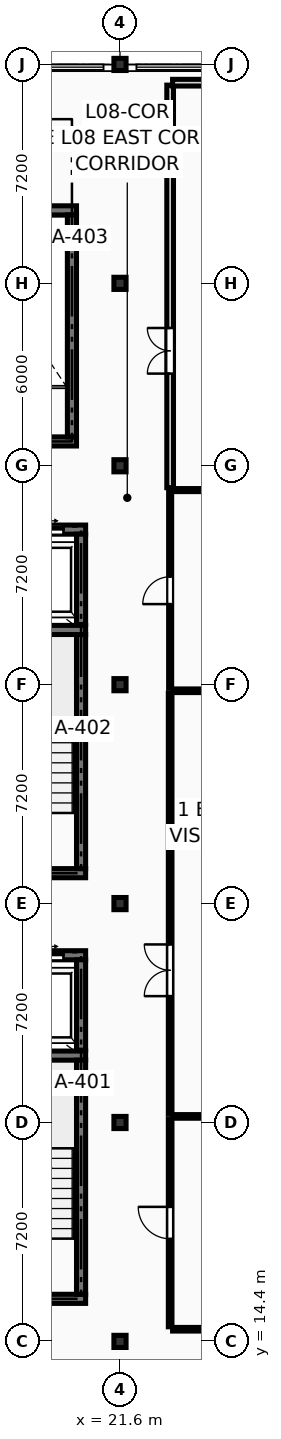
"""IFC4 building model, lengths in metres.
Left out: names, types, materials, properties, quantities, classifications, styles, units other than length and angle.
Written with IfcOpenShell. Run it as: python <this file> out.ifc"""

import sys

from ifc_helpers import new_model, si_unit, direction, frame, frame_2d, origin, origin_2d, place, context, subcontext, project, spatial, rectangle, extrude, element, fill, save


model = new_model("IFC4")
c1 = context("Model", 3, precision=1e-05, world=origin(), true_north=direction((0.0, 1.0)))
c2 = subcontext(c1, "Body", "Model", "MODEL_VIEW")
j1 = project(units=[si_unit("LENGTHUNIT", "METRE"), si_unit("PLANEANGLEUNIT", "RADIAN")], contexts=[c1])
p1 = place(None, origin())
s1 = spatial("IfcSite", under=j1, at=p1, CompositionType="ELEMENT")
p2 = place(p1, origin())
s2 = spatial("IfcBuilding", under=s1, at=p2, CompositionType="ELEMENT")
p3 = place(p2, frame((0.0, 0.0, 29.7)))
s3 = spatial("IfcBuildingStorey", under=s2, at=p3, CompositionType="ELEMENT", Elevation=29.7)
for number, where, z_axis, x_axis in (
    (1, (21.6, 14.4, 0.0), (0.0, 0.0, 1.0), (1.0, 0.0, 0.0)),
    (2, (21.6, 21.6, 0.0), (0.0, 0.0, 1.0), (1.0, 0.0, 0.0)),
    (3, (21.6, 28.8, 0.0), (0.0, 0.0, 1.0), (1.0, 0.0, 0.0)),
    (4, (21.6, 36.0, 0.0), (0.0, 0.0, 1.0), (1.0, 0.0, 0.0)),
    (5, (21.6, 43.2, 0.0), (0.0, 0.0, 1.0), (1.0, 0.0, 0.0)),
    (6, (21.6, 49.2, 0.0), (0.0, 0.0, 1.0), (1.0, 0.0, 0.0)),
    (7, (21.6, 56.4, 0.0), (0.0, 0.0, 1.0), (1.0, 0.0, 0.0)),
):
    element("IfcColumn", number, at=place(p3, frame(where, z_axis=z_axis, x_axis=x_axis)), inside=s3, PredefinedType="COLUMN", context=c2, shape_type="SweptSolid", body=[
        extrude(rectangle(XDim=0.4, YDim=0.4, at=origin_2d()), origin(), (0.0, 0.0, 1.0), 3.6),
    ])
for number, where, z_axis, x_axis in (
    (8, (15.65, 15.8, 0.0), (0.0, 0.0, 1.0), (1.0, 0.0, 0.0)),
    (9, (15.65, 23.8, 0.0), (0.0, 0.0, 1.0), (1.0, 0.0, 0.0)),
):
    element("IfcWall", number, at=place(p3, frame(where, z_axis=z_axis, x_axis=x_axis)), inside=s3, PredefinedType="SHEAR", context=c2, shape_type="SweptSolid", body=[
        extrude(rectangle(XDim=4.82, YDim=0.3, at=frame_2d((2.41, 0.0))), origin(), (0.0, 0.0, 1.0), 3.4),
    ])
p4 = place(p3, frame((20.32, 15.95, 0.0), z_axis=(0.0, 0.0, 1.0), x_axis=(0.0, 1.0, 0.0)))
e10 = element("IfcWall", 10, at=p4, inside=s3, PredefinedType="SHEAR", context=c2, shape_type="SweptSolid", body=[
    extrude(rectangle(XDim=7.7, YDim=0.3, at=frame_2d((3.85, 0.0))), origin(), (0.0, 0.0, 1.0), 3.4),
])
for number, where, z_axis, x_axis in (
    (11, (15.65, 29.8, 0.0), (0.0, 0.0, 1.0), (1.0, 0.0, 0.0)),
    (12, (15.65, 37.8, 0.0), (0.0, 0.0, 1.0), (1.0, 0.0, 0.0)),
):
    element("IfcWall", number, at=place(p3, frame(where, z_axis=z_axis, x_axis=x_axis)), inside=s3, PredefinedType="SHEAR", context=c2, shape_type="SweptSolid", body=[
        extrude(rectangle(XDim=4.82, YDim=0.3, at=frame_2d((2.41, 0.0))), origin(), (0.0, 0.0, 1.0), 3.4),
    ])
p5 = place(p3, frame((20.32, 29.95, 0.0), z_axis=(0.0, 0.0, 1.0), x_axis=(0.0, 1.0, 0.0)))
e13 = element("IfcWall", 13, at=p5, inside=s3, PredefinedType="SHEAR", context=c2, shape_type="SweptSolid", body=[
    extrude(rectangle(XDim=7.7, YDim=0.3, at=frame_2d((3.85, 0.0))), origin(), (0.0, 0.0, 1.0), 3.4),
])
for number, where, z_axis, x_axis in (
    (14, (15.75, 44.0, 0.0), (0.0, 0.0, 1.0), (1.0, 0.0, 0.0)),
    (15, (15.75, 51.6, 0.0), (0.0, 0.0, 1.0), (1.0, 0.0, 0.0)),
):
    element("IfcWall", number, at=place(p3, frame(where, z_axis=z_axis, x_axis=x_axis)), inside=s3, PredefinedType="SHEAR", context=c2, shape_type="SweptSolid", body=[
        extrude(rectangle(XDim=4.42, YDim=0.3, at=frame_2d((2.21, 0.0))), origin(), (0.0, 0.0, 1.0), 3.4),
    ])
p6 = place(p3, frame((20.02, 44.15, 0.0), z_axis=(0.0, 0.0, 1.0), x_axis=(0.0, 1.0, 0.0)))
e16 = element("IfcWall", 16, at=p6, inside=s3, PredefinedType="SHEAR", context=c2, shape_type="SweptSolid", body=[
    extrude(rectangle(XDim=7.3, YDim=0.3, at=frame_2d((3.65, 0.0))), origin(), (0.0, 0.0, 1.0), 3.4),
])
p7 = place(p3, frame((17.91, 27.1, 0.0), z_axis=(0.0, 0.0, 1.0), x_axis=(1.0, 0.0, 0.0)))
e17 = element("IfcWall", 17, at=p7, inside=s3, PredefinedType="SHEAR", context=c2, shape_type="SweptSolid", body=[
    extrude(rectangle(XDim=2.56, YDim=0.3, at=frame_2d((1.28, 0.0))), origin(), (0.0, 0.0, 1.0), 3.4),
])
p8 = place(p7, frame((0.73, 0.0, 0.0)))
e18 = element("IfcOpeningElement", 18, at=p8, cuts=e17, PredefinedType="OPENING", context=c2, shape_type="SweptSolid", body=[
    extrude(rectangle(XDim=1.1, YDim=2.2, at=frame_2d((0.55, 1.1))), frame((0.0, 0.162, 0.0), z_axis=(0.0, -1.0, 0.0), x_axis=(1.0, 0.0, 0.0)), (0.0, 0.0, 1.0), 0.324),
])
p9 = place(p3, frame((20.32, 23.98, 0.0), z_axis=(0.0, 0.0, 1.0), x_axis=(0.0, 1.0, 0.0)))
e19 = element("IfcWall", 19, at=p9, inside=s3, PredefinedType="SHEAR", context=c2, shape_type="SweptSolid", body=[
    extrude(rectangle(XDim=2.97, YDim=0.3, at=frame_2d((1.485, 0.0))), origin(), (0.0, 0.0, 1.0), 3.4),
])
p10 = place(p3, frame((17.91, 41.1, 0.0), z_axis=(0.0, 0.0, 1.0), x_axis=(1.0, 0.0, 0.0)))
e20 = element("IfcWall", 20, at=p10, inside=s3, PredefinedType="SHEAR", context=c2, shape_type="SweptSolid", body=[
    extrude(rectangle(XDim=2.56, YDim=0.3, at=frame_2d((1.28, 0.0))), origin(), (0.0, 0.0, 1.0), 3.4),
])
p11 = place(p10, frame((0.73, 0.0, 0.0)))
e21 = element("IfcOpeningElement", 21, at=p11, cuts=e20, PredefinedType="OPENING", context=c2, shape_type="SweptSolid", body=[
    extrude(rectangle(XDim=1.1, YDim=2.2, at=frame_2d((0.55, 1.1))), frame((0.0, 0.162, 0.0), z_axis=(0.0, -1.0, 0.0), x_axis=(1.0, 0.0, 0.0)), (0.0, 0.0, 1.0), 0.324),
])
p12 = place(p3, frame((20.32, 37.98, 0.0), z_axis=(0.0, 0.0, 1.0), x_axis=(0.0, 1.0, 0.0)))
e22 = element("IfcWall", 22, at=p12, inside=s3, PredefinedType="SHEAR", context=c2, shape_type="SweptSolid", body=[
    extrude(rectangle(XDim=2.97, YDim=0.3, at=frame_2d((1.485, 0.0))), origin(), (0.0, 0.0, 1.0), 3.4),
])
p13 = place(p3, frame((23.25, 14.88, 0.0), z_axis=(0.0, 0.0, 1.0), x_axis=(0.0, 1.0, 0.0)))
e23 = element("IfcWall", 23, at=p13, inside=s3, PredefinedType="PARTITIONING", context=c2, shape_type="SweptSolid", body=[
    extrude(rectangle(XDim=6.84, YDim=0.12, at=frame_2d((3.42, 0.0))), origin(), (0.0, 0.0, 1.0), 3.385),
])
p14 = place(p13, frame((2.895, 0.0, 0.0)))
e24 = element("IfcOpeningElement", 24, at=p14, cuts=e23, PredefinedType="OPENING", context=c2, shape_type="SweptSolid", body=[
    extrude(rectangle(XDim=1.05, YDim=2.18, at=frame_2d((0.525, 1.09))), frame((0.0, 0.072, 0.0), z_axis=(0.0, -1.0, 0.0), x_axis=(1.0, 0.0, 0.0)), (0.0, 0.0, 1.0), 0.144),
])
p15 = place(p3, frame((23.33, 14.8, 0.0), z_axis=(0.0, 0.0, 1.0), x_axis=(1.0, 0.0, 0.0)))
e25 = element("IfcWall", 25, at=p15, inside=s3, PredefinedType="PARTITIONING", context=c2, shape_type="SweptSolid", body=[
    extrude(rectangle(XDim=4.99, YDim=0.12, at=frame_2d((2.495, 0.0))), origin(), (0.0, 0.0, 1.0), 3.385),
])
p16 = place(p3, frame((23.33, 21.8, 0.0), z_axis=(0.0, 0.0, 1.0), x_axis=(1.0, 0.0, 0.0)))
e26 = element("IfcWall", 26, at=p16, inside=s3, PredefinedType="PARTITIONING", context=c2, shape_type="SweptSolid", body=[
    extrude(rectangle(XDim=4.99, YDim=0.12, at=frame_2d((2.495, 0.0))), origin(), (0.0, 0.0, 1.0), 2.701),
])
p17 = place(p3, frame((23.25, 21.88, 0.0), z_axis=(0.0, 0.0, 1.0), x_axis=(0.0, 1.0, 0.0)))
e27 = element("IfcWall", 27, at=p17, inside=s3, PredefinedType="PARTITIONING", context=c2, shape_type="SweptSolid", body=[
    extrude(rectangle(XDim=13.84, YDim=0.12, at=frame_2d((6.92, 0.0))), origin(), (0.0, 0.0, 1.0), 3.385),
])
p18 = place(p17, frame((3.876, 0.0, 0.0)))
e28 = element("IfcOpeningElement", 28, at=p18, cuts=e27, PredefinedType="OPENING", context=c2, shape_type="SweptSolid", body=[
    extrude(rectangle(XDim=1.7, YDim=2.28, at=frame_2d((0.85, 1.14))), frame((0.0, 0.072, 0.0), z_axis=(0.0, -1.0, 0.0), x_axis=(1.0, 0.0, 0.0)), (0.0, 0.0, 1.0), 0.144),
])
p19 = place(p3, frame((23.33, 35.8, 0.0), z_axis=(0.0, 0.0, 1.0), x_axis=(1.0, 0.0, 0.0)))
e29 = element("IfcWall", 29, at=p19, inside=s3, PredefinedType="PARTITIONING", context=c2, shape_type="SweptSolid", body=[
    extrude(rectangle(XDim=9.69, YDim=0.12, at=frame_2d((4.845, 0.0))), origin(), (0.0, 0.0, 1.0), 2.701),
])
p20 = place(p3, frame((23.25, 35.88, 0.0), z_axis=(0.0, 0.0, 1.0), x_axis=(0.0, 1.0, 0.0)))
e30 = element("IfcWall", 30, at=p20, inside=s3, PredefinedType="PARTITIONING", context=c2, shape_type="SweptSolid", body=[
    extrude(rectangle(XDim=6.44, YDim=0.1, at=frame_2d((3.22, 0.0))), origin(), (0.0, 0.0, 1.0), 3.385),
])
p21 = place(p20, frame((2.77, 0.0, 0.0)))
e31 = element("IfcOpeningElement", 31, at=p21, cuts=e30, PredefinedType="OPENING", context=c2, shape_type="SweptSolid", body=[
    extrude(rectangle(XDim=0.9, YDim=2.1, at=frame_2d((0.45, 1.05))), frame((0.0, 0.062, 0.0), z_axis=(0.0, -1.0, 0.0), x_axis=(1.0, 0.0, 0.0)), (0.0, 0.0, 1.0), 0.124),
])
p22 = place(p3, frame((23.33, 42.4, 0.0), z_axis=(0.0, 0.0, 1.0), x_axis=(1.0, 0.0, 0.0)))
e32 = element("IfcWall", 32, at=p22, inside=s3, PredefinedType="PARTITIONING", context=c2, shape_type="SweptSolid", body=[
    extrude(rectangle(XDim=4.99, YDim=0.1, at=frame_2d((2.495, 0.0))), origin(), (0.0, 0.0, 1.0), 3.385),
])
p23 = place(p3, frame((23.25, 42.48, 0.0), z_axis=(0.0, 0.0, 1.0), x_axis=(0.0, 1.0, 0.0)))
e33 = element("IfcWall", 33, at=p23, inside=s3, PredefinedType="PARTITIONING", context=c2, shape_type="SweptSolid", body=[
    extrude(rectangle(XDim=13.24, YDim=0.22, at=frame_2d((6.62, 0.0))), origin(), (0.0, 0.0, 1.0), 3.385),
])
p24 = place(p23, frame((3.751, 0.0, 0.0)))
e34 = element("IfcOpeningElement", 34, at=p24, cuts=e33, PredefinedType="OPENING", context=c2, shape_type="SweptSolid", body=[
    extrude(rectangle(XDim=1.5, YDim=2.25, at=frame_2d((0.75, 1.125))), frame((0.0, 0.122, 0.0), z_axis=(0.0, -1.0, 0.0), x_axis=(1.0, 0.0, 0.0)), (0.0, 0.0, 1.0), 0.244),
])
p25 = place(p3, frame((23.33, 55.8, 0.0), z_axis=(0.0, 0.0, 1.0), x_axis=(1.0, 0.0, 0.0)))
e35 = element("IfcWall", 35, at=p25, inside=s3, PredefinedType="PARTITIONING", context=c2, shape_type="SweptSolid", body=[
    extrude(rectangle(XDim=4.99, YDim=0.22, at=frame_2d((2.495, 0.0))), origin(), (0.0, 0.0, 1.0), 3.385),
])
p26 = place(p8, origin())
e36 = element("IfcDoor", 36, at=p26, inside=s3, OperationType="DOUBLE_DOOR_SLIDING", PredefinedType="DOOR", context=c2, shape_type="SweptSolid", body=[
    extrude(rectangle(XDim=1.1, YDim=2.2, at=frame_2d((0.55, 1.1))), frame((0.0, 0.025, 0.0), z_axis=(0.0, -1.0, 0.0), x_axis=(1.0, 0.0, 0.0)), (0.0, 0.0, 1.0), 0.05),
])
fill(e18, e36)
p27 = place(p11, origin())
e37 = element("IfcDoor", 37, at=p27, inside=s3, OperationType="DOUBLE_DOOR_SLIDING", PredefinedType="DOOR", context=c2, shape_type="SweptSolid", body=[
    extrude(rectangle(XDim=1.1, YDim=2.2, at=frame_2d((0.55, 1.1))), frame((0.0, 0.025, 0.0), z_axis=(0.0, -1.0, 0.0), x_axis=(1.0, 0.0, 0.0)), (0.0, 0.0, 1.0), 0.05),
])
fill(e21, e37)
p28 = place(p14, origin())
e38 = element("IfcDoor", 38, at=p28, inside=s3, OperationType="SINGLE_SWING_RIGHT", PredefinedType="DOOR", context=c2, shape_type="SweptSolid", body=[
    extrude(rectangle(XDim=1.05, YDim=2.18, at=frame_2d((0.525, 1.09))), frame((0.0, 0.025, 0.0), z_axis=(0.0, -1.0, 0.0), x_axis=(1.0, 0.0, 0.0)), (0.0, 0.0, 1.0), 0.05),
])
fill(e24, e38)
p29 = place(p18, origin())
e39 = element("IfcDoor", 39, at=p29, inside=s3, OperationType="DOUBLE_DOOR_SINGLE_SWING", PredefinedType="DOOR", context=c2, shape_type="SweptSolid", body=[
    extrude(rectangle(XDim=1.7, YDim=2.28, at=frame_2d((0.85, 1.14))), frame((0.0, 0.025, 0.0), z_axis=(0.0, -1.0, 0.0), x_axis=(1.0, 0.0, 0.0)), (0.0, 0.0, 1.0), 0.05),
])
fill(e28, e39)
p30 = place(p21, origin())
e40 = element("IfcDoor", 40, at=p30, inside=s3, OperationType="SINGLE_SWING_LEFT", PredefinedType="DOOR", context=c2, shape_type="SweptSolid", body=[
    extrude(rectangle(XDim=0.9, YDim=2.1, at=frame_2d((0.45, 1.05))), frame((0.0, 0.025, 0.0), z_axis=(0.0, -1.0, 0.0), x_axis=(1.0, 0.0, 0.0)), (0.0, 0.0, 1.0), 0.05),
])
fill(e31, e40)
p31 = place(p24, origin())
e41 = element("IfcDoor", 41, at=p31, inside=s3, OperationType="DOUBLE_DOOR_SINGLE_SWING", PredefinedType="DOOR", context=c2, shape_type="SweptSolid", body=[
    extrude(rectangle(XDim=1.5, YDim=2.25, at=frame_2d((0.75, 1.125))), frame((0.0, 0.025, 0.0), z_axis=(0.0, -1.0, 0.0), x_axis=(1.0, 0.0, 0.0)), (0.0, 0.0, 1.0), 0.05),
])
fill(e34, e41)
save(model, sys.argv[1])
